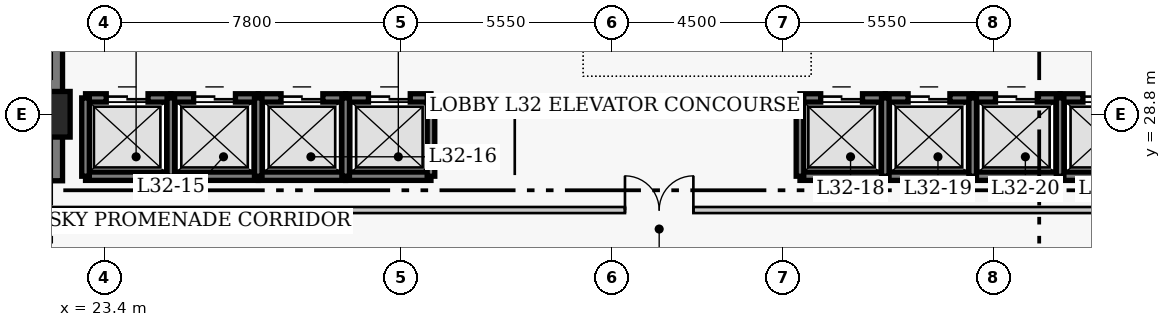
"""IFC4 building model, lengths in metres.
Left out: names, types, materials, properties, quantities, classifications, styles, units other than length and angle.
Written with IfcOpenShell. Run it as: python <this file> out.ifc"""

import sys

from ifc_helpers import new_model, si_unit, direction, frame, frame_2d, origin, origin_2d, place, context, subcontext, project, spatial, rectangle, extrude, element, fill, save


model = new_model("IFC4")
c1 = context("Model", 3, precision=1e-05, world=origin(), true_north=direction((0.0, 1.0)))
c2 = subcontext(c1, "Body", "Model", "MODEL_VIEW")
j1 = project(units=[si_unit("LENGTHUNIT", "METRE"), si_unit("PLANEANGLEUNIT", "RADIAN")], contexts=[c1])
p1 = place(None, origin())
s1 = spatial("IfcSite", under=j1, at=p1, CompositionType="ELEMENT")
p2 = place(p1, origin())
s2 = spatial("IfcBuilding", under=s1, at=p2, CompositionType="ELEMENT")
p3 = place(p2, frame((0.0, 0.0, 129.8)))
s3 = spatial("IfcBuildingStorey", under=s2, at=p3, CompositionType="ELEMENT", Elevation=129.8)
p4 = place(p3, frame((21.9, 27.05, 0.0), z_axis=(0.0, 0.0, 1.0), x_axis=(0.0, 1.0, 0.0)))
e1 = element("IfcWall", 1, at=p4, inside=s3, PredefinedType="SHEAR", context=c2, shape_type="SweptSolid", body=[
    extrude(rectangle(XDim=13.67, YDim=0.8, at=frame_2d((6.835, 0.0))), origin(), (0.0, 0.0, 1.0), 4.8),
])
p5 = place(p3, frame((21.9, 28.8, 0.0), z_axis=(0.0, 0.0, 1.0), x_axis=(1.0, 0.0, 0.0)))
e2 = element("IfcColumn", 2, at=p5, inside=s3, PredefinedType="COLUMN", context=c2, shape_type="SweptSolid", body=[
    extrude(rectangle(XDim=1.2, YDim=1.2, at=origin_2d()), origin(), (0.0, 0.0, 1.0), 4.8),
])
p6 = place(p3, frame((22.905, 29.23, 0.0), z_axis=(0.0, 0.0, 1.0), x_axis=(1.0, 0.0, 0.0)))
e3 = element("IfcWall", 3, at=p6, inside=s3, PredefinedType="SHEAR", context=c2, shape_type="SweptSolid", body=[
    extrude(rectangle(XDim=2.245, YDim=0.22, at=frame_2d((1.123, 0.0))), origin(), (0.0, 0.0, 1.0), 4.8),
])
p7 = place(p6, frame((0.545, 0.0, 0.0)))
e4 = element("IfcOpeningElement", 4, at=p7, cuts=e3, PredefinedType="OPENING", context=c2, shape_type="SweptSolid", body=[
    extrude(rectangle(XDim=1.1, YDim=2.15, at=frame_2d((0.55, 1.075))), frame((0.0, 0.12, 0.0), z_axis=(0.0, -1.0, 0.0), x_axis=(1.0, 0.0, 0.0)), (0.0, 0.0, 1.0), 0.24),
])
p8 = place(p3, frame((22.905, 27.17, 0.0), z_axis=(0.0, 0.0, 1.0), x_axis=(1.0, 0.0, 0.0)))
e5 = element("IfcWall", 5, at=p8, inside=s3, PredefinedType="SHEAR", context=c2, shape_type="SweptSolid", body=[
    extrude(rectangle(XDim=2.245, YDim=0.22, at=frame_2d((1.123, 0.0))), origin(), (0.0, 0.0, 1.0), 4.8),
])
p9 = place(p3, frame((22.905, 27.17, 0.0), z_axis=(0.0, 0.0, 1.0), x_axis=(0.0, 1.0, 0.0)))
e6 = element("IfcWall", 6, at=p9, inside=s3, PredefinedType="SHEAR", context=c2, shape_type="SweptSolid", body=[
    extrude(rectangle(XDim=2.06, YDim=0.2, at=frame_2d((1.03, 0.0))), origin(), (0.0, 0.0, 1.0), 4.8),
])
p10 = place(p3, frame((25.15, 29.23, 0.0), z_axis=(0.0, 0.0, 1.0), x_axis=(1.0, 0.0, 0.0)))
e7 = element("IfcWall", 7, at=p10, inside=s3, PredefinedType="SHEAR", context=c2, shape_type="SweptSolid", body=[
    extrude(rectangle(XDim=2.3, YDim=0.22, at=frame_2d((1.15, 0.0))), origin(), (0.0, 0.0, 1.0), 4.8),
])
p11 = place(p10, frame((0.6, 0.0, 0.0)))
e8 = element("IfcOpeningElement", 8, at=p11, cuts=e7, PredefinedType="OPENING", context=c2, shape_type="SweptSolid", body=[
    extrude(rectangle(XDim=1.1, YDim=2.15, at=frame_2d((0.55, 1.075))), frame((0.0, 0.12, 0.0), z_axis=(0.0, -1.0, 0.0), x_axis=(1.0, 0.0, 0.0)), (0.0, 0.0, 1.0), 0.24),
])
p12 = place(p3, frame((25.15, 27.17, 0.0), z_axis=(0.0, 0.0, 1.0), x_axis=(1.0, 0.0, 0.0)))
e9 = element("IfcWall", 9, at=p12, inside=s3, PredefinedType="SHEAR", context=c2, shape_type="SweptSolid", body=[
    extrude(rectangle(XDim=2.3, YDim=0.22, at=frame_2d((1.15, 0.0))), origin(), (0.0, 0.0, 1.0), 4.8),
])
p13 = place(p3, frame((25.15, 27.17, 0.0), z_axis=(0.0, 0.0, 1.0), x_axis=(0.0, 1.0, 0.0)))
e10 = element("IfcWall", 10, at=p13, inside=s3, PredefinedType="SHEAR", context=c2, shape_type="SweptSolid", body=[
    extrude(rectangle(XDim=2.06, YDim=0.2, at=frame_2d((1.03, 0.0))), origin(), (0.0, 0.0, 1.0), 4.8),
])
p14 = place(p3, frame((27.45, 29.23, 0.0), z_axis=(0.0, 0.0, 1.0), x_axis=(1.0, 0.0, 0.0)))
e11 = element("IfcWall", 11, at=p14, inside=s3, PredefinedType="SHEAR", context=c2, shape_type="SweptSolid", body=[
    extrude(rectangle(XDim=2.3, YDim=0.22, at=frame_2d((1.15, 0.0))), origin(), (0.0, 0.0, 1.0), 4.8),
])
p15 = place(p14, frame((0.6, 0.0, 0.0)))
e12 = element("IfcOpeningElement", 12, at=p15, cuts=e11, PredefinedType="OPENING", context=c2, shape_type="SweptSolid", body=[
    extrude(rectangle(XDim=1.1, YDim=2.15, at=frame_2d((0.55, 1.075))), frame((0.0, 0.12, 0.0), z_axis=(0.0, -1.0, 0.0), x_axis=(1.0, 0.0, 0.0)), (0.0, 0.0, 1.0), 0.24),
])
p16 = place(p3, frame((27.45, 27.17, 0.0), z_axis=(0.0, 0.0, 1.0), x_axis=(1.0, 0.0, 0.0)))
e13 = element("IfcWall", 13, at=p16, inside=s3, PredefinedType="SHEAR", context=c2, shape_type="SweptSolid", body=[
    extrude(rectangle(XDim=2.3, YDim=0.22, at=frame_2d((1.15, 0.0))), origin(), (0.0, 0.0, 1.0), 4.8),
])
p17 = place(p3, frame((27.45, 27.17, 0.0), z_axis=(0.0, 0.0, 1.0), x_axis=(0.0, 1.0, 0.0)))
e14 = element("IfcWall", 14, at=p17, inside=s3, PredefinedType="SHEAR", context=c2, shape_type="SweptSolid", body=[
    extrude(rectangle(XDim=2.06, YDim=0.2, at=frame_2d((1.03, 0.0))), origin(), (0.0, 0.0, 1.0), 4.8),
])
p18 = place(p3, frame((29.75, 29.23, 0.0), z_axis=(0.0, 0.0, 1.0), x_axis=(1.0, 0.0, 0.0)))
e15 = element("IfcWall", 15, at=p18, inside=s3, PredefinedType="SHEAR", context=c2, shape_type="SweptSolid", body=[
    extrude(rectangle(XDim=2.245, YDim=0.22, at=frame_2d((1.123, 0.0))), origin(), (0.0, 0.0, 1.0), 4.8),
])
p19 = place(p18, frame((0.6, 0.0, 0.0)))
e16 = element("IfcOpeningElement", 16, at=p19, cuts=e15, PredefinedType="OPENING", context=c2, shape_type="SweptSolid", body=[
    extrude(rectangle(XDim=1.1, YDim=2.15, at=frame_2d((0.55, 1.075))), frame((0.0, 0.12, 0.0), z_axis=(0.0, -1.0, 0.0), x_axis=(1.0, 0.0, 0.0)), (0.0, 0.0, 1.0), 0.24),
])
p20 = place(p3, frame((29.75, 27.17, 0.0), z_axis=(0.0, 0.0, 1.0), x_axis=(1.0, 0.0, 0.0)))
e17 = element("IfcWall", 17, at=p20, inside=s3, PredefinedType="SHEAR", context=c2, shape_type="SweptSolid", body=[
    extrude(rectangle(XDim=2.245, YDim=0.22, at=frame_2d((1.123, 0.0))), origin(), (0.0, 0.0, 1.0), 4.8),
])
for number, where, z_axis, x_axis in (
    (18, (29.75, 27.17, 0.0), (0.0, 0.0, 1.0), (0.0, 1.0, 0.0)),
    (19, (31.995, 27.17, 0.0), (0.0, 0.0, 1.0), (0.0, 1.0, 0.0)),
):
    element("IfcWall", number, at=place(p3, frame(where, z_axis=z_axis, x_axis=x_axis)), inside=s3, PredefinedType="SHEAR", context=c2, shape_type="SweptSolid", body=[
        extrude(rectangle(XDim=2.06, YDim=0.2, at=frame_2d((1.03, 0.0))), origin(), (0.0, 0.0, 1.0), 4.8),
    ])
p21 = place(p3, frame((41.705, 29.23, 0.0), z_axis=(0.0, 0.0, 1.0), x_axis=(1.0, 0.0, 0.0)))
e20 = element("IfcWall", 20, at=p21, inside=s3, PredefinedType="SHEAR", context=c2, shape_type="SweptSolid", body=[
    extrude(rectangle(XDim=2.245, YDim=0.22, at=frame_2d((1.123, 0.0))), origin(), (0.0, 0.0, 1.0), 4.8),
])
p22 = place(p21, frame((0.545, 0.0, 0.0)))
e21 = element("IfcOpeningElement", 21, at=p22, cuts=e20, PredefinedType="OPENING", context=c2, shape_type="SweptSolid", body=[
    extrude(rectangle(XDim=1.1, YDim=2.15, at=frame_2d((0.55, 1.075))), frame((0.0, 0.12, 0.0), z_axis=(0.0, -1.0, 0.0), x_axis=(1.0, 0.0, 0.0)), (0.0, 0.0, 1.0), 0.24),
])
p23 = place(p3, frame((41.705, 27.17, 0.0), z_axis=(0.0, 0.0, 1.0), x_axis=(1.0, 0.0, 0.0)))
e22 = element("IfcWall", 22, at=p23, inside=s3, PredefinedType="SHEAR", context=c2, shape_type="SweptSolid", body=[
    extrude(rectangle(XDim=2.245, YDim=0.22, at=frame_2d((1.123, 0.0))), origin(), (0.0, 0.0, 1.0), 4.8),
])
p24 = place(p3, frame((41.705, 27.17, 0.0), z_axis=(0.0, 0.0, 1.0), x_axis=(0.0, 1.0, 0.0)))
e23 = element("IfcWall", 23, at=p24, inside=s3, PredefinedType="SHEAR", context=c2, shape_type="SweptSolid", body=[
    extrude(rectangle(XDim=2.06, YDim=0.2, at=frame_2d((1.03, 0.0))), origin(), (0.0, 0.0, 1.0), 4.8),
])
p25 = place(p3, frame((43.95, 29.23, 0.0), z_axis=(0.0, 0.0, 1.0), x_axis=(1.0, 0.0, 0.0)))
e24 = element("IfcWall", 24, at=p25, inside=s3, PredefinedType="SHEAR", context=c2, shape_type="SweptSolid", body=[
    extrude(rectangle(XDim=2.3, YDim=0.22, at=frame_2d((1.15, 0.0))), origin(), (0.0, 0.0, 1.0), 4.8),
])
p26 = place(p25, frame((0.6, 0.0, 0.0)))
e25 = element("IfcOpeningElement", 25, at=p26, cuts=e24, PredefinedType="OPENING", context=c2, shape_type="SweptSolid", body=[
    extrude(rectangle(XDim=1.1, YDim=2.15, at=frame_2d((0.55, 1.075))), frame((0.0, 0.12, 0.0), z_axis=(0.0, -1.0, 0.0), x_axis=(1.0, 0.0, 0.0)), (0.0, 0.0, 1.0), 0.24),
])
p27 = place(p3, frame((43.95, 27.17, 0.0), z_axis=(0.0, 0.0, 1.0), x_axis=(1.0, 0.0, 0.0)))
e26 = element("IfcWall", 26, at=p27, inside=s3, PredefinedType="SHEAR", context=c2, shape_type="SweptSolid", body=[
    extrude(rectangle(XDim=2.3, YDim=0.22, at=frame_2d((1.15, 0.0))), origin(), (0.0, 0.0, 1.0), 4.8),
])
p28 = place(p3, frame((43.95, 27.17, 0.0), z_axis=(0.0, 0.0, 1.0), x_axis=(0.0, 1.0, 0.0)))
e27 = element("IfcWall", 27, at=p28, inside=s3, PredefinedType="SHEAR", context=c2, shape_type="SweptSolid", body=[
    extrude(rectangle(XDim=2.06, YDim=0.2, at=frame_2d((1.03, 0.0))), origin(), (0.0, 0.0, 1.0), 4.8),
])
p29 = place(p3, frame((46.25, 29.23, 0.0), z_axis=(0.0, 0.0, 1.0), x_axis=(1.0, 0.0, 0.0)))
e28 = element("IfcWall", 28, at=p29, inside=s3, PredefinedType="SHEAR", context=c2, shape_type="SweptSolid", body=[
    extrude(rectangle(XDim=2.3, YDim=0.22, at=frame_2d((1.15, 0.0))), origin(), (0.0, 0.0, 1.0), 4.8),
])
p30 = place(p29, frame((0.6, 0.0, 0.0)))
e29 = element("IfcOpeningElement", 29, at=p30, cuts=e28, PredefinedType="OPENING", context=c2, shape_type="SweptSolid", body=[
    extrude(rectangle(XDim=1.1, YDim=2.15, at=frame_2d((0.55, 1.075))), frame((0.0, 0.12, 0.0), z_axis=(0.0, -1.0, 0.0), x_axis=(1.0, 0.0, 0.0)), (0.0, 0.0, 1.0), 0.24),
])
p31 = place(p3, frame((46.25, 27.17, 0.0), z_axis=(0.0, 0.0, 1.0), x_axis=(1.0, 0.0, 0.0)))
e30 = element("IfcWall", 30, at=p31, inside=s3, PredefinedType="SHEAR", context=c2, shape_type="SweptSolid", body=[
    extrude(rectangle(XDim=2.3, YDim=0.22, at=frame_2d((1.15, 0.0))), origin(), (0.0, 0.0, 1.0), 4.8),
])
p32 = place(p3, frame((46.25, 27.17, 0.0), z_axis=(0.0, 0.0, 1.0), x_axis=(0.0, 1.0, 0.0)))
e31 = element("IfcWall", 31, at=p32, inside=s3, PredefinedType="SHEAR", context=c2, shape_type="SweptSolid", body=[
    extrude(rectangle(XDim=2.06, YDim=0.2, at=frame_2d((1.03, 0.0))), origin(), (0.0, 0.0, 1.0), 4.8),
])
p33 = place(p3, frame((48.55, 29.23, 0.0), z_axis=(0.0, 0.0, 1.0), x_axis=(1.0, 0.0, 0.0)))
e32 = element("IfcWall", 32, at=p33, inside=s3, PredefinedType="SHEAR", context=c2, shape_type="SweptSolid", body=[
    extrude(rectangle(XDim=2.245, YDim=0.22, at=frame_2d((1.123, 0.0))), origin(), (0.0, 0.0, 1.0), 4.8),
])
p34 = place(p33, frame((0.6, 0.0, 0.0)))
e33 = element("IfcOpeningElement", 33, at=p34, cuts=e32, PredefinedType="OPENING", context=c2, shape_type="SweptSolid", body=[
    extrude(rectangle(XDim=1.1, YDim=2.15, at=frame_2d((0.55, 1.075))), frame((0.0, 0.12, 0.0), z_axis=(0.0, -1.0, 0.0), x_axis=(1.0, 0.0, 0.0)), (0.0, 0.0, 1.0), 0.24),
])
p35 = place(p3, frame((48.55, 27.17, 0.0), z_axis=(0.0, 0.0, 1.0), x_axis=(1.0, 0.0, 0.0)))
e34 = element("IfcWall", 34, at=p35, inside=s3, PredefinedType="SHEAR", context=c2, shape_type="SweptSolid", body=[
    extrude(rectangle(XDim=2.245, YDim=0.22, at=frame_2d((1.123, 0.0))), origin(), (0.0, 0.0, 1.0), 4.8),
])
p36 = place(p3, frame((48.55, 27.17, 0.0), z_axis=(0.0, 0.0, 1.0), x_axis=(0.0, 1.0, 0.0)))
e35 = element("IfcWall", 35, at=p36, inside=s3, PredefinedType="SHEAR", context=c2, shape_type="SweptSolid", body=[
    extrude(rectangle(XDim=2.06, YDim=0.2, at=frame_2d((1.03, 0.0))), origin(), (0.0, 0.0, 1.0), 4.8),
])
p37 = place(p3, frame((4.3, 26.28, 0.0), z_axis=(0.0, 0.0, 1.0), x_axis=(1.0, 0.0, 0.0)))
e36 = element("IfcWall", 36, at=p37, inside=s3, PredefinedType="PARTITIONING", context=c2, shape_type="SweptSolid", body=[
    extrude(rectangle(XDim=69.4, YDim=0.16, at=frame_2d((34.7, 0.0))), origin(), (0.0, 0.0, 1.0), 4.55),
])
p38 = place(p37, frame((32.8, 0.0, 0.0)))
e37 = element("IfcOpeningElement", 37, at=p38, cuts=e36, PredefinedType="OPENING", context=c2, shape_type="SweptSolid", body=[
    extrude(rectangle(XDim=1.8, YDim=2.2, at=frame_2d((0.9, 1.1))), frame((0.0, 0.09, 0.0), z_axis=(0.0, -1.0, 0.0), x_axis=(1.0, 0.0, 0.0)), (0.0, 0.0, 1.0), 0.18),
])
p39 = place(p37, frame((8.25, 0.0, 0.0)))
e38 = element("IfcOpeningElement", 38, at=p39, cuts=e36, PredefinedType="OPENING", context=c2, shape_type="SweptSolid", body=[
    extrude(rectangle(XDim=1.0, YDim=2.15, at=frame_2d((0.5, 1.075))), frame((0.0, 0.09, 0.0), z_axis=(0.0, -1.0, 0.0), x_axis=(1.0, 0.0, 0.0)), (0.0, 0.0, 1.0), 0.18),
])
p40 = place(p37, frame((54.31, 0.0, 0.0)))
e39 = element("IfcOpeningElement", 39, at=p40, cuts=e36, PredefinedType="OPENING", context=c2, shape_type="SweptSolid", body=[
    extrude(rectangle(XDim=0.88, YDim=2.05, at=frame_2d((0.44, 1.025))), frame((0.0, 0.09, 0.0), z_axis=(0.0, -1.0, 0.0), x_axis=(1.0, 0.0, 0.0)), (0.0, 0.0, 1.0), 0.18),
])
p41 = place(p37, frame((56.55, 0.0, 0.0)))
e40 = element("IfcOpeningElement", 40, at=p41, cuts=e36, PredefinedType="OPENING", context=c2, shape_type="SweptSolid", body=[
    extrude(rectangle(XDim=1.0, YDim=2.15, at=frame_2d((0.5, 1.075))), frame((0.0, 0.09, 0.0), z_axis=(0.0, -1.0, 0.0), x_axis=(1.0, 0.0, 0.0)), (0.0, 0.0, 1.0), 0.18),
])
p42 = place(p7, origin())
e41 = element("IfcDoor", 41, at=p42, inside=s3, OperationType="DOUBLE_DOOR_SLIDING", PredefinedType="DOOR", context=c2, shape_type="SweptSolid", body=[
    extrude(rectangle(XDim=1.1, YDim=2.15, at=frame_2d((0.55, 1.075))), frame((0.0, 0.025, 0.0), z_axis=(0.0, -1.0, 0.0), x_axis=(1.0, 0.0, 0.0)), (0.0, 0.0, 1.0), 0.05),
])
fill(e4, e41)
p43 = place(p11, origin())
e42 = element("IfcDoor", 42, at=p43, inside=s3, OperationType="DOUBLE_DOOR_SLIDING", PredefinedType="DOOR", context=c2, shape_type="SweptSolid", body=[
    extrude(rectangle(XDim=1.1, YDim=2.15, at=frame_2d((0.55, 1.075))), frame((0.0, 0.025, 0.0), z_axis=(0.0, -1.0, 0.0), x_axis=(1.0, 0.0, 0.0)), (0.0, 0.0, 1.0), 0.05),
])
fill(e8, e42)
p44 = place(p15, origin())
e43 = element("IfcDoor", 43, at=p44, inside=s3, OperationType="DOUBLE_DOOR_SLIDING", PredefinedType="DOOR", context=c2, shape_type="SweptSolid", body=[
    extrude(rectangle(XDim=1.1, YDim=2.15, at=frame_2d((0.55, 1.075))), frame((0.0, 0.025, 0.0), z_axis=(0.0, -1.0, 0.0), x_axis=(1.0, 0.0, 0.0)), (0.0, 0.0, 1.0), 0.05),
])
fill(e12, e43)
p45 = place(p19, origin())
e44 = element("IfcDoor", 44, at=p45, inside=s3, OperationType="DOUBLE_DOOR_SLIDING", PredefinedType="DOOR", context=c2, shape_type="SweptSolid", body=[
    extrude(rectangle(XDim=1.1, YDim=2.15, at=frame_2d((0.55, 1.075))), frame((0.0, 0.025, 0.0), z_axis=(0.0, -1.0, 0.0), x_axis=(1.0, 0.0, 0.0)), (0.0, 0.0, 1.0), 0.05),
])
fill(e16, e44)
p46 = place(p22, origin())
e45 = element("IfcDoor", 45, at=p46, inside=s3, OperationType="DOUBLE_DOOR_SLIDING", PredefinedType="DOOR", context=c2, shape_type="SweptSolid", body=[
    extrude(rectangle(XDim=1.1, YDim=2.15, at=frame_2d((0.55, 1.075))), frame((0.0, 0.025, 0.0), z_axis=(0.0, -1.0, 0.0), x_axis=(1.0, 0.0, 0.0)), (0.0, 0.0, 1.0), 0.05),
])
fill(e21, e45)
p47 = place(p26, origin())
e46 = element("IfcDoor", 46, at=p47, inside=s3, OperationType="DOUBLE_DOOR_SLIDING", PredefinedType="DOOR", context=c2, shape_type="SweptSolid", body=[
    extrude(rectangle(XDim=1.1, YDim=2.15, at=frame_2d((0.55, 1.075))), frame((0.0, 0.025, 0.0), z_axis=(0.0, -1.0, 0.0), x_axis=(1.0, 0.0, 0.0)), (0.0, 0.0, 1.0), 0.05),
])
fill(e25, e46)
p48 = place(p30, origin())
e47 = element("IfcDoor", 47, at=p48, inside=s3, OperationType="DOUBLE_DOOR_SLIDING", PredefinedType="DOOR", context=c2, shape_type="SweptSolid", body=[
    extrude(rectangle(XDim=1.1, YDim=2.15, at=frame_2d((0.55, 1.075))), frame((0.0, 0.025, 0.0), z_axis=(0.0, -1.0, 0.0), x_axis=(1.0, 0.0, 0.0)), (0.0, 0.0, 1.0), 0.05),
])
fill(e29, e47)
p49 = place(p34, origin())
e48 = element("IfcDoor", 48, at=p49, inside=s3, OperationType="DOUBLE_DOOR_SLIDING", PredefinedType="DOOR", context=c2, shape_type="SweptSolid", body=[
    extrude(rectangle(XDim=1.1, YDim=2.15, at=frame_2d((0.55, 1.075))), frame((0.0, 0.025, 0.0), z_axis=(0.0, -1.0, 0.0), x_axis=(1.0, 0.0, 0.0)), (0.0, 0.0, 1.0), 0.05),
])
fill(e33, e48)
p50 = place(p38, origin())
e49 = element("IfcDoor", 49, at=p50, inside=s3, OperationType="DOUBLE_DOOR_SINGLE_SWING", PredefinedType="DOOR", context=c2, shape_type="SweptSolid", body=[
    extrude(rectangle(XDim=1.8, YDim=2.2, at=frame_2d((0.9, 1.1))), frame((0.0, 0.025, 0.0), z_axis=(0.0, -1.0, 0.0), x_axis=(1.0, 0.0, 0.0)), (0.0, 0.0, 1.0), 0.05),
])
fill(e37, e49)
save(model, sys.argv[1])
